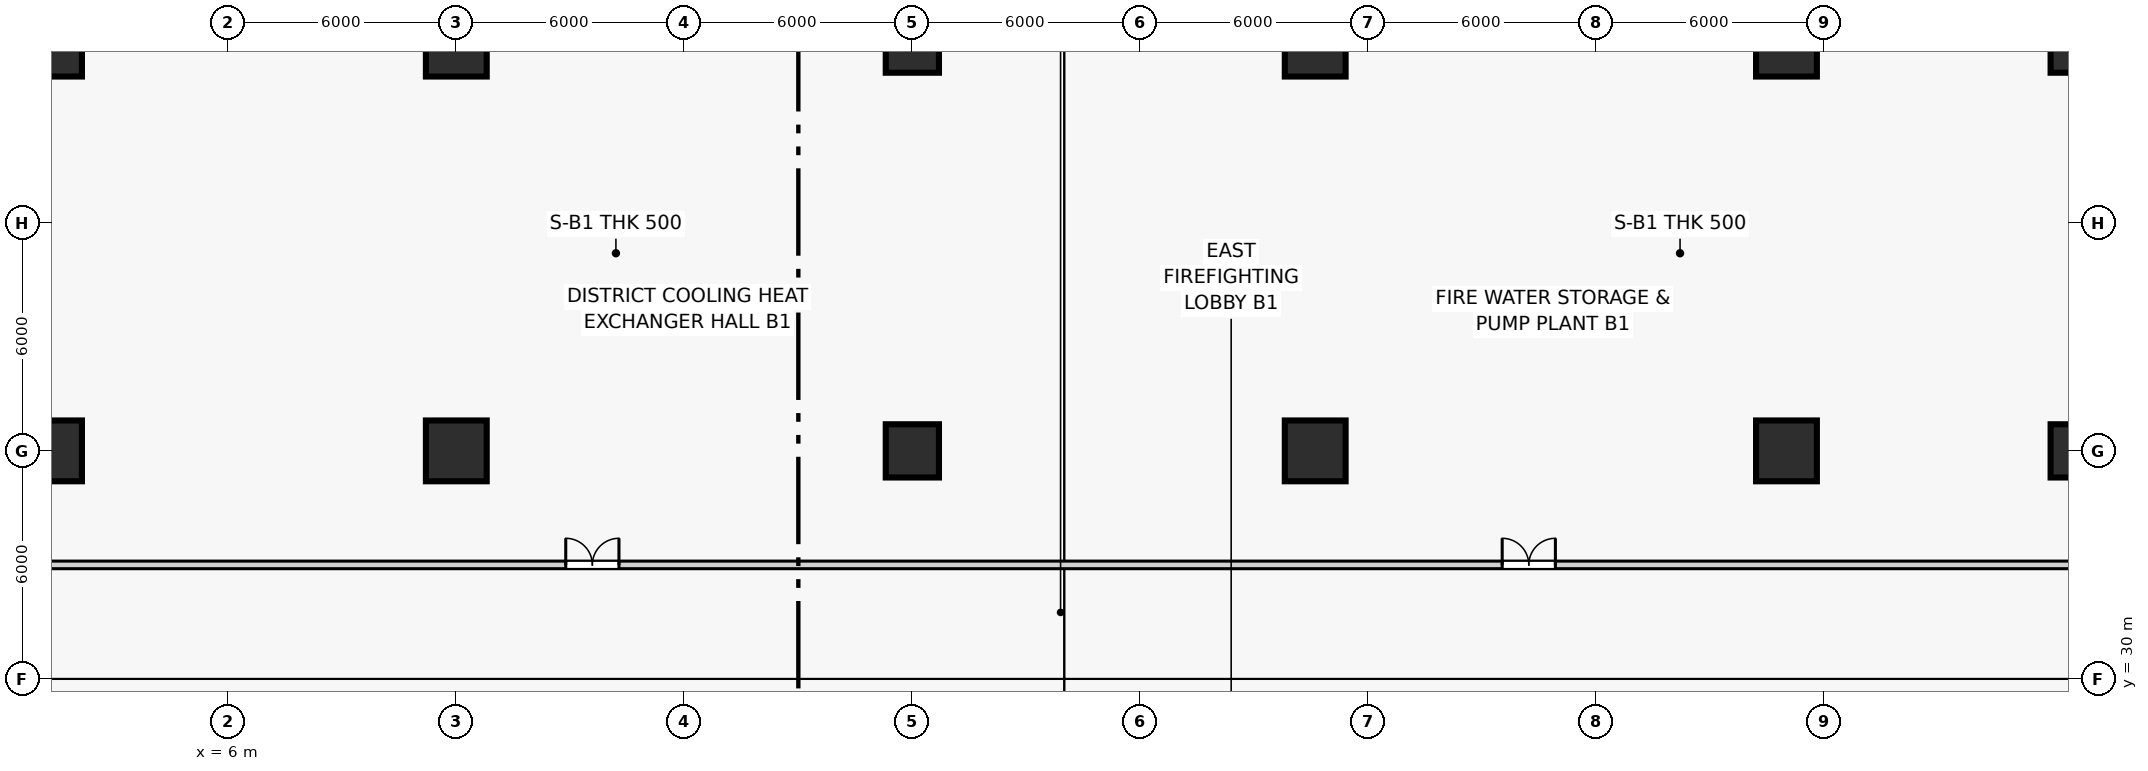
"""IFC4 building model, lengths in metres.
Left out: names, types, materials, properties, quantities, classifications, styles, units other than length and angle.
Written with IfcOpenShell. Run it as: python <this file> out.ifc"""

import sys

from ifc_helpers import new_model, si_unit, direction, frame, frame_2d, origin, origin_2d, place, context, subcontext, project, spatial, rectangle, extrude, source, transform, mapped, element, fill, save


model = new_model("IFC4")
c1 = context("Model", 3, precision=1e-05, world=origin(), true_north=direction((0.0, 1.0)))
c2 = subcontext(c1, "Body", "Model", "MODEL_VIEW")
j1 = project(units=[si_unit("LENGTHUNIT", "METRE"), si_unit("PLANEANGLEUNIT", "RADIAN")], contexts=[c1])
p1 = place(None, origin())
s1 = spatial("IfcSite", under=j1, at=p1, CompositionType="ELEMENT")
p2 = place(p1, origin())
s2 = spatial("IfcBuilding", under=s1, at=p2, CompositionType="ELEMENT")
p3 = place(p2, frame((0.0, 0.0, -4.5)))
s3 = spatial("IfcBuildingStorey", under=s2, at=p3, CompositionType="ELEMENT", Elevation=-4.5)
m1 = source(origin(), c2, "Body", "SweptSolid", [
    extrude(rectangle(XDim=1.6, YDim=1.6, at=origin_2d()), origin(), (0.0, 0.0, 1.0), 4.5),
])
for number, where, z_axis, x_axis in (
    (1, (1.35, 36.0, 0.0), (0.0, 0.0, 1.0), (1.0, 0.0, 0.0)),
    (2, (1.35, 46.65, 0.0), (0.0, 0.0, 1.0), (1.0, 0.0, 0.0)),
    (3, (12.0, 36.0, 0.0), (0.0, 0.0, 1.0), (1.0, 0.0, 0.0)),
    (4, (12.0, 46.65, 0.0), (0.0, 0.0, 1.0), (1.0, 0.0, 0.0)),
):
    element("IfcColumn", number, at=place(p3, frame(where, z_axis=z_axis, x_axis=x_axis)), inside=s3, PredefinedType="COLUMN", context=c2, shape_type="MappedRepresentation", body=[
        mapped(m1, transform((0.0, 0.0, 0.0), scale=1.0)),
    ])
m2 = source(origin(), c2, "Body", "SweptSolid", [
    extrude(rectangle(XDim=1.4, YDim=1.4, at=origin_2d()), origin(), (0.0, 0.0, 1.0), 4.5),
])
for number, where, z_axis, x_axis in (
    (5, (24.0, 36.0, 0.0), (0.0, 0.0, 1.0), (1.0, 0.0, 0.0)),
    (6, (24.0, 46.65, 0.0), (0.0, 0.0, 1.0), (1.0, 0.0, 0.0)),
):
    element("IfcColumn", number, at=place(p3, frame(where, z_axis=z_axis, x_axis=x_axis)), inside=s3, PredefinedType="COLUMN", context=c2, shape_type="MappedRepresentation", body=[
        mapped(m2, transform((0.0, 0.0, 0.0), scale=1.0)),
    ])
for number, where, z_axis, x_axis in (
    (7, (34.6, 36.0, 0.0), (0.0, 0.0, 1.0), (1.0, 0.0, 0.0)),
    (8, (34.6, 46.65, 0.0), (0.0, 0.0, 1.0), (1.0, 0.0, 0.0)),
    (9, (47.0, 36.0, 0.0), (0.0, 0.0, 1.0), (1.0, 0.0, 0.0)),
    (10, (47.0, 46.65, 0.0), (0.0, 0.0, 1.0), (1.0, 0.0, 0.0)),
):
    element("IfcColumn", number, at=place(p3, frame(where, z_axis=z_axis, x_axis=x_axis)), inside=s3, PredefinedType="COLUMN", context=c2, shape_type="MappedRepresentation", body=[
        mapped(m1, transform((0.0, 0.0, 0.0), scale=1.0)),
    ])
for number, where, z_axis, x_axis in (
    (11, (54.65, 36.0, 0.0), (0.0, 0.0, 1.0), (1.0, 0.0, 0.0)),
    (12, (54.65, 46.65, 0.0), (0.0, 0.0, 1.0), (1.0, 0.0, 0.0)),
):
    element("IfcColumn", number, at=place(p3, frame(where, z_axis=z_axis, x_axis=x_axis)), inside=s3, PredefinedType="COLUMN", context=c2, shape_type="MappedRepresentation", body=[
        mapped(m2, transform((0.0, 0.0, 0.0), scale=1.0)),
    ])
p4 = place(p3, frame((0.295, 33.0, 0.0), z_axis=(0.0, 0.0, 1.0), x_axis=(1.0, 0.0, 0.0)))
e13 = element("IfcWall", 13, at=p4, inside=s3, PredefinedType="PARTITIONING", context=c2, shape_type="SweptSolid", body=[
    extrude(rectangle(XDim=55.41, YDim=0.2, at=frame_2d((27.705, 0.0))), origin(), (0.0, 0.0, 1.0), 4.16),
])
p5 = place(p4, frame((14.585, 0.0, 0.0)))
e14 = element("IfcOpeningElement", 14, at=p5, cuts=e13, PredefinedType="OPENING", context=c2, shape_type="SweptSolid", body=[
    extrude(rectangle(XDim=1.4, YDim=2.2, at=frame_2d((0.7, 1.1))), frame((0.0, 0.11, 0.0), z_axis=(0.0, -1.0, 0.0), x_axis=(1.0, 0.0, 0.0)), (0.0, 0.0, 1.0), 0.22),
])
p6 = place(p4, frame((39.225, 0.0, 0.0)))
e15 = element("IfcOpeningElement", 15, at=p6, cuts=e13, PredefinedType="OPENING", context=c2, shape_type="SweptSolid", body=[
    extrude(rectangle(XDim=1.4, YDim=2.2, at=frame_2d((0.7, 1.1))), frame((0.0, 0.11, 0.0), z_axis=(0.0, -1.0, 0.0), x_axis=(1.0, 0.0, 0.0)), (0.0, 0.0, 1.0), 0.22),
])
m3 = source(origin(), c2, "Body", "SweptSolid", [
    extrude(rectangle(XDim=1.4, YDim=2.2, at=frame_2d((0.7, 1.1))), frame((0.0, 0.025, 0.0), z_axis=(0.0, -1.0, 0.0), x_axis=(1.0, 0.0, 0.0)), (0.0, 0.0, 1.0), 0.05),
])
p7 = place(p5, origin())
e16 = element("IfcDoor", 16, at=p7, inside=s3, OperationType="DOUBLE_DOOR_SINGLE_SWING", PredefinedType="DOOR", context=c2, shape_type="MappedRepresentation", body=[
    mapped(m3, transform((0.0, 0.0, 0.0), scale=1.0)),
])
fill(e14, e16)
p8 = place(p6, origin())
e17 = element("IfcDoor", 17, at=p8, inside=s3, OperationType="DOUBLE_DOOR_SINGLE_SWING", PredefinedType="DOOR", context=c2, shape_type="MappedRepresentation", body=[
    mapped(m3, transform((0.0, 0.0, 0.0), scale=1.0)),
])
fill(e15, e17)
save(model, sys.argv[1])
